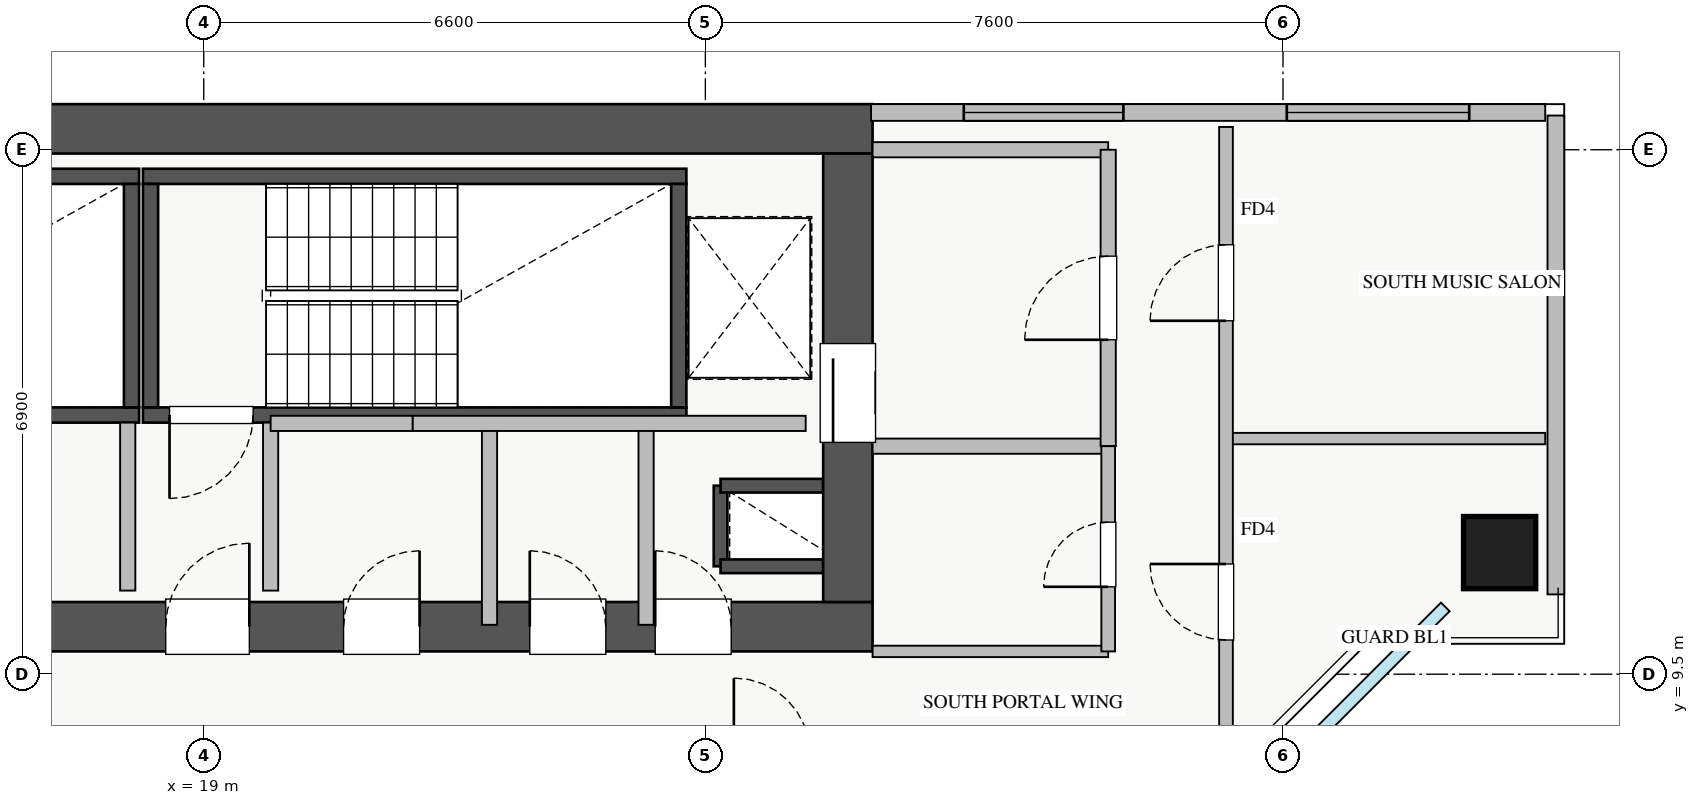
"""IFC4 building model, lengths in metres.
Left out: names, types, materials, properties, quantities, classifications, styles, units other than length and angle.
Written with IfcOpenShell. Run it as: python <this file> out.ifc"""

import sys

from ifc_helpers import new_model, si_unit, direction, frame, frame_2d, origin, origin_2d, place, context, subcontext, project, spatial, rectangle, extrude, source, transform, mapped, element, fill, save


model = new_model("IFC4")
c1 = context("Model", 3, precision=1e-05, world=origin(), true_north=direction((0.0, 1.0)))
c2 = subcontext(c1, "Body", "Model", "MODEL_VIEW")
j1 = project(units=[si_unit("LENGTHUNIT", "METRE"), si_unit("PLANEANGLEUNIT", "RADIAN")], contexts=[c1])
p1 = place(None, origin())
s1 = spatial("IfcSite", under=j1, at=p1, CompositionType="ELEMENT")
p2 = place(p1, origin())
s2 = spatial("IfcBuilding", under=s1, at=p2, CompositionType="ELEMENT")
p3 = place(p2, frame((0.0, 0.0, 169.75)))
s3 = spatial("IfcBuildingStorey", under=s2, at=p3, CompositionType="ELEMENT", Elevation=169.75)
p4 = place(p3, frame((25.8, 10.92, 0.0), z_axis=(0.0, 0.0, 1.0), x_axis=(0.0, 1.0, 0.0)))
e1 = element("IfcWall", 1, at=p4, inside=s3, PredefinedType="SHEAR", context=c2, shape_type="SweptSolid", body=[
    extrude(rectangle(XDim=1.06, YDim=0.18, at=frame_2d((0.53, 0.0))), origin(), (0.0, 0.0, 1.0), 3.0),
])
for number, where, z_axis, x_axis in (
    (2, (25.8, 11.98, 0.0), (0.0, 0.0, 1.0), (1.0, 0.0, 0.0)),
    (3, (25.8, 10.92, 0.0), (0.0, 0.0, 1.0), (1.0, 0.0, 0.0)),
):
    element("IfcWall", number, at=place(p3, frame(where, z_axis=z_axis, x_axis=x_axis)), inside=s3, PredefinedType="SHEAR", context=c2, shape_type="SweptSolid", body=[
        extrude(rectangle(XDim=1.35, YDim=0.18, at=frame_2d((0.675, 0.0))), origin(), (0.0, 0.0, 1.0), 3.0),
    ])
p5 = place(p3, frame((10.85, 12.91, 0.0), z_axis=(0.0, 0.0, 1.0), x_axis=(1.0, 0.0, 0.0)))
e4 = element("IfcWall", 4, at=p5, inside=s3, PredefinedType="SHEAR", context=c2, shape_type="SweptSolid", body=[
    extrude(rectangle(XDim=7.3, YDim=0.2, at=frame_2d((3.65, 0.0))), origin(), (0.0, 0.0, 1.0), 3.25),
])
p6 = place(p5, frame((0.35, 0.0, 0.0)))
e5 = element("IfcOpeningElement", 5, at=p6, cuts=e4, PredefinedType="OPENING", context=c2, shape_type="SweptSolid", body=[
    extrude(rectangle(XDim=1.1, YDim=2.05, at=frame_2d((0.55, 1.025))), frame((0.0, 0.11, 0.0), z_axis=(0.0, -1.0, 0.0), x_axis=(1.0, 0.0, 0.0)), (0.0, 0.0, 1.0), 0.22),
])
p7 = place(p3, frame((10.85, 16.05, 0.0), z_axis=(0.0, 0.0, 1.0), x_axis=(1.0, 0.0, 0.0)))
e6 = element("IfcWall", 6, at=p7, inside=s3, PredefinedType="SHEAR", context=c2, shape_type="SweptSolid", body=[
    extrude(rectangle(XDim=7.3, YDim=0.2, at=frame_2d((3.65, 0.0))), origin(), (0.0, 0.0, 1.0), 3.25),
])
p8 = place(p3, frame((18.05, 13.01, 0.0), z_axis=(0.0, 0.0, 1.0), x_axis=(0.0, 1.0, 0.0)))
e7 = element("IfcWall", 7, at=p8, inside=s3, PredefinedType="SHEAR", context=c2, shape_type="SweptSolid", body=[
    extrude(rectangle(XDim=2.94, YDim=0.2, at=frame_2d((1.47, 0.0))), origin(), (0.0, 0.0, 1.0), 3.25),
])
p9 = place(p3, frame((18.2, 12.91, 0.0), z_axis=(0.0, 0.0, 1.0), x_axis=(1.0, 0.0, 0.0)))
e8 = element("IfcWall", 8, at=p9, inside=s3, PredefinedType="SHEAR", context=c2, shape_type="SweptSolid", body=[
    extrude(rectangle(XDim=7.15, YDim=0.2, at=frame_2d((3.575, 0.0))), origin(), (0.0, 0.0, 1.0), 3.25),
])
p10 = place(p9, frame((0.35, 0.0, 0.0)))
e9 = element("IfcOpeningElement", 9, at=p10, cuts=e8, PredefinedType="OPENING", context=c2, shape_type="SweptSolid", body=[
    extrude(rectangle(XDim=1.1, YDim=2.05, at=frame_2d((0.55, 1.025))), frame((0.0, 0.11, 0.0), z_axis=(0.0, -1.0, 0.0), x_axis=(1.0, 0.0, 0.0)), (0.0, 0.0, 1.0), 0.22),
])
p11 = place(p3, frame((18.2, 16.05, 0.0), z_axis=(0.0, 0.0, 1.0), x_axis=(1.0, 0.0, 0.0)))
e10 = element("IfcWall", 10, at=p11, inside=s3, PredefinedType="SHEAR", context=c2, shape_type="SweptSolid", body=[
    extrude(rectangle(XDim=7.15, YDim=0.2, at=frame_2d((3.575, 0.0))), origin(), (0.0, 0.0, 1.0), 3.25),
])
for number, where, z_axis, x_axis in (
    (11, (18.3, 13.01, 0.0), (0.0, 0.0, 1.0), (0.0, 1.0, 0.0)),
    (12, (25.25, 13.01, 0.0), (0.0, 0.0, 1.0), (0.0, 1.0, 0.0)),
):
    element("IfcWall", number, at=place(p3, frame(where, z_axis=z_axis, x_axis=x_axis)), inside=s3, PredefinedType="SHEAR", context=c2, shape_type="SweptSolid", body=[
        extrude(rectangle(XDim=2.94, YDim=0.2, at=frame_2d((1.47, 0.0))), origin(), (0.0, 0.0, 1.0), 3.25),
    ])
p12 = place(p3, frame((10.2, 10.125, 0.0), z_axis=(0.0, 0.0, 1.0), x_axis=(1.0, 0.0, 0.0)))
e13 = element("IfcWall", 13, at=p12, inside=s3, PredefinedType="SHEAR", context=c2, shape_type="SweptSolid", body=[
    extrude(rectangle(XDim=17.6, YDim=0.65, at=frame_2d((8.8, 0.0))), origin(), (0.0, 0.0, 1.0), 3.25),
])
p13 = place(p12, frame((1.15, 0.0, 0.0)))
e14 = element("IfcOpeningElement", 14, at=p13, cuts=e13, PredefinedType="OPENING", context=c2, shape_type="SweptSolid", body=[
    extrude(rectangle(XDim=1.1, YDim=2.05, at=frame_2d((0.55, 1.025))), frame((0.0, 0.335, 0.0), z_axis=(0.0, -1.0, 0.0), x_axis=(1.0, 0.0, 0.0)), (0.0, 0.0, 1.0), 0.67),
])
p14 = place(p12, frame((8.3, 0.0, 0.0)))
e15 = element("IfcOpeningElement", 15, at=p14, cuts=e13, PredefinedType="OPENING", context=c2, shape_type="SweptSolid", body=[
    extrude(rectangle(XDim=1.1, YDim=2.05, at=frame_2d((0.55, 1.025))), frame((0.0, 0.335, 0.0), z_axis=(0.0, -1.0, 0.0), x_axis=(1.0, 0.0, 0.0)), (0.0, 0.0, 1.0), 0.67),
])
p15 = place(p12, frame((4.9, 0.0, 0.0)))
e16 = element("IfcOpeningElement", 16, at=p15, cuts=e13, PredefinedType="OPENING", context=c2, shape_type="SweptSolid", body=[
    extrude(rectangle(XDim=1.1, YDim=2.05, at=frame_2d((0.55, 1.025))), frame((0.0, 0.335, 0.0), z_axis=(0.0, -1.0, 0.0), x_axis=(1.0, 0.0, 0.0)), (0.0, 0.0, 1.0), 0.67),
])
p16 = place(p12, frame((14.74, 0.0, 0.0)))
e17 = element("IfcOpeningElement", 17, at=p16, cuts=e13, PredefinedType="OPENING", context=c2, shape_type="SweptSolid", body=[
    extrude(rectangle(XDim=1.0, YDim=2.05, at=frame_2d((0.5, 1.025))), frame((0.0, 0.335, 0.0), z_axis=(0.0, -1.0, 0.0), x_axis=(1.0, 0.0, 0.0)), (0.0, 0.0, 1.0), 0.67),
])
p17 = place(p12, frame((10.64, 0.0, 0.0)))
e18 = element("IfcOpeningElement", 18, at=p17, cuts=e13, PredefinedType="OPENING", context=c2, shape_type="SweptSolid", body=[
    extrude(rectangle(XDim=1.0, YDim=2.05, at=frame_2d((0.5, 1.025))), frame((0.0, 0.335, 0.0), z_axis=(0.0, -1.0, 0.0), x_axis=(1.0, 0.0, 0.0)), (0.0, 0.0, 1.0), 0.67),
])
p18 = place(p12, frame((13.09, 0.0, 0.0)))
e19 = element("IfcOpeningElement", 19, at=p18, cuts=e13, PredefinedType="OPENING", context=c2, shape_type="SweptSolid", body=[
    extrude(rectangle(XDim=1.0, YDim=2.05, at=frame_2d((0.5, 1.025))), frame((0.0, 0.335, 0.0), z_axis=(0.0, -1.0, 0.0), x_axis=(1.0, 0.0, 0.0)), (0.0, 0.0, 1.0), 0.67),
])
p19 = place(p3, frame((10.2, 16.675, 0.0), z_axis=(0.0, 0.0, 1.0), x_axis=(1.0, 0.0, 0.0)))
e20 = element("IfcWall", 20, at=p19, inside=s3, PredefinedType="SHEAR", context=c2, shape_type="SweptSolid", body=[
    extrude(rectangle(XDim=17.6, YDim=0.65, at=frame_2d((8.8, 0.0))), origin(), (0.0, 0.0, 1.0), 3.25),
])
p20 = place(p3, frame((27.475, 10.45, 0.0), z_axis=(0.0, 0.0, 1.0), x_axis=(0.0, 1.0, 0.0)))
e21 = element("IfcWall", 21, at=p20, inside=s3, PredefinedType="SHEAR", context=c2, shape_type="SweptSolid", body=[
    extrude(rectangle(XDim=5.9, YDim=0.65, at=frame_2d((2.95, 0.0))), origin(), (0.0, 0.0, 1.0), 3.25),
])
p21 = place(p20, frame((2.1, 0.0, 0.0)))
e22 = element("IfcOpeningElement", 22, at=p21, cuts=e21, PredefinedType="OPENING", context=c2, shape_type="SweptSolid", body=[
    extrude(rectangle(XDim=1.3, YDim=2.05, at=frame_2d((0.65, 1.025))), frame((0.0, 0.335, 0.0), z_axis=(0.0, -1.0, 0.0), x_axis=(1.0, 0.0, 0.0)), (0.0, 0.0, 1.0), 0.67),
])
m1 = source(origin(), c2, "Body", "SweptSolid", [
    extrude(rectangle(XDim=0.95, YDim=0.95, at=origin_2d()), origin(), (0.0, 0.0, 1.0), 3.25),
])
p22 = place(p3, frame((36.05, 11.1, 0.0), z_axis=(0.0, 0.0, 1.0), x_axis=(1.0, 0.0, 0.0)))
e23 = element("IfcColumn", 23, at=p22, inside=s3, PredefinedType="COLUMN", context=c2, shape_type="MappedRepresentation", body=[
    mapped(m1, transform((0.0, 0.0, 0.0), x_axis=(1.0, 0.0, 0.0), y_axis=(0.0, 1.0, 0.0), z_axis=(0.0, 0.0, 1.0), scale=1.0)),
])
p23 = place(p3, frame((27.78, 16.89, 0.0), z_axis=(0.0, 0.0, 1.0), x_axis=(1.0, 0.0, 0.0)))
e24 = element("IfcWall", 24, at=p23, inside=s3, PredefinedType="STANDARD", context=c2, shape_type="SweptSolid", body=[
    extrude(rectangle(XDim=8.87, YDim=0.22, at=frame_2d((4.435, 0.0))), origin(), (0.0, 0.0, 1.0), 2.54),
])
p24 = place(p23, frame((1.22, 0.0, 0.9)))
e25 = element("IfcOpeningElement", 25, at=p24, cuts=e24, PredefinedType="OPENING", context=c2, shape_type="SweptSolid", body=[
    extrude(rectangle(XDim=2.1, YDim=1.46, at=frame_2d((1.05, 0.73))), frame((0.0, 0.12, 0.0), z_axis=(0.0, -1.0, 0.0), x_axis=(1.0, 0.0, 0.0)), (0.0, 0.0, 1.0), 0.24),
])
p25 = place(p23, frame((5.47, 0.0, 0.9)))
e26 = element("IfcOpeningElement", 26, at=p25, cuts=e24, PredefinedType="OPENING", context=c2, shape_type="SweptSolid", body=[
    extrude(rectangle(XDim=2.4, YDim=1.46, at=frame_2d((1.2, 0.73))), frame((0.0, 0.12, 0.0), z_axis=(0.0, -1.0, 0.0), x_axis=(1.0, 0.0, 0.0)), (0.0, 0.0, 1.0), 0.24),
])
p26 = place(p3, frame((36.79, 10.55, 0.0), z_axis=(0.0, 0.0, 1.0), x_axis=(0.0, 1.0, 0.0)))
e27 = element("IfcWall", 27, at=p26, inside=s3, PredefinedType="STANDARD", context=c2, shape_type="SweptSolid", body=[
    extrude(rectangle(XDim=6.3, YDim=0.22, at=frame_2d((3.15, 0.0))), origin(), (0.0, 0.0, 1.0), 2.54),
])
for number, where, z_axis, x_axis in (
    (28, (27.8, 16.4, 0.0), (0.0, 0.0, 1.0), (1.0, 0.0, 0.0)),
    (29, (27.8, 12.5, 0.0), (0.0, 0.0, 1.0), (1.0, 0.0, 0.0)),
):
    element("IfcWall", number, at=place(p3, frame(where, z_axis=z_axis, x_axis=x_axis)), inside=s3, PredefinedType="PARTITIONING", context=c2, shape_type="SweptSolid", body=[
        extrude(rectangle(XDim=3.1, YDim=0.2, at=frame_2d((1.55, 0.0))), origin(), (0.0, 0.0, 1.0), 3.0),
    ])
p27 = place(p3, frame((30.9, 12.5, 0.0), z_axis=(0.0, 0.0, 1.0), x_axis=(0.0, 1.0, 0.0)))
e30 = element("IfcWall", 30, at=p27, inside=s3, PredefinedType="PARTITIONING", context=c2, shape_type="SweptSolid", body=[
    extrude(rectangle(XDim=3.9, YDim=0.2, at=frame_2d((1.95, 0.0))), origin(), (0.0, 0.0, 1.0), 3.0),
])
p28 = place(p27, frame((1.4, 0.0, 0.0)))
e31 = element("IfcOpeningElement", 31, at=p28, cuts=e30, PredefinedType="OPENING", context=c2, shape_type="SweptSolid", body=[
    extrude(rectangle(XDim=1.1, YDim=2.05, at=frame_2d((0.55, 1.025))), frame((0.0, 0.11, 0.0), z_axis=(0.0, -1.0, 0.0), x_axis=(1.0, 0.0, 0.0)), (0.0, 0.0, 1.0), 0.22),
])
for number, where, z_axis, x_axis in (
    (32, (18.0, 10.6, 0.0), (0.0, 0.0, 1.0), (0.0, 1.0, 0.0)),
    (33, (19.88, 10.6, 0.0), (0.0, 0.0, 1.0), (0.0, 1.0, 0.0)),
):
    element("IfcWall", number, at=place(p3, frame(where, z_axis=z_axis, x_axis=x_axis)), inside=s3, PredefinedType="PARTITIONING", context=c2, shape_type="SweptSolid", body=[
        extrude(rectangle(XDim=2.21, YDim=0.2, at=frame_2d((1.105, 0.0))), origin(), (0.0, 0.0, 1.0), 3.0),
    ])
p29 = place(p3, frame((24.82, 10.15, 0.0), z_axis=(0.0, 0.0, 1.0), x_axis=(0.0, 1.0, 0.0)))
e34 = element("IfcWall", 34, at=p29, inside=s3, PredefinedType="PARTITIONING", context=c2, shape_type="SweptSolid", body=[
    extrude(rectangle(XDim=2.65, YDim=0.2, at=frame_2d((1.325, 0.0))), origin(), (0.0, 0.0, 1.0), 3.0),
])
p30 = place(p3, frame((19.88, 12.8, 0.0), z_axis=(0.0, 0.0, 1.0), x_axis=(1.0, 0.0, 0.0)))
e35 = element("IfcWall", 35, at=p30, inside=s3, PredefinedType="PARTITIONING", context=c2, shape_type="SweptSolid", body=[
    extrude(rectangle(XDim=1.87, YDim=0.2, at=frame_2d((0.935, 0.0))), origin(), (0.0, 0.0, 1.0), 3.0),
])
p31 = place(p3, frame((22.76, 10.15, 0.0), z_axis=(0.0, 0.0, 1.0), x_axis=(0.0, 1.0, 0.0)))
e36 = element("IfcWall", 36, at=p31, inside=s3, PredefinedType="PARTITIONING", context=c2, shape_type="SweptSolid", body=[
    extrude(rectangle(XDim=2.65, YDim=0.2, at=frame_2d((1.325, 0.0))), origin(), (0.0, 0.0, 1.0), 3.0),
])
p32 = place(p3, frame((21.75, 12.8, 0.0), z_axis=(0.0, 0.0, 1.0), x_axis=(1.0, 0.0, 0.0)))
e37 = element("IfcWall", 37, at=p32, inside=s3, PredefinedType="PARTITIONING", context=c2, shape_type="SweptSolid", body=[
    extrude(rectangle(XDim=5.17, YDim=0.2, at=frame_2d((2.585, 0.0))), origin(), (0.0, 0.0, 1.0), 3.0),
])
p33 = place(p3, frame((27.8, 9.8, 0.0), z_axis=(0.0, 0.0, 1.0), x_axis=(1.0, 0.0, 0.0)))
e38 = element("IfcWall", 38, at=p33, inside=s3, PredefinedType="PARTITIONING", context=c2, shape_type="SweptSolid", body=[
    extrude(rectangle(XDim=3.1, YDim=0.15, at=frame_2d((1.55, 0.0))), origin(), (0.0, 0.0, 1.0), 3.0),
])
p34 = place(p3, frame((30.9, 9.8, 0.0), z_axis=(0.0, 0.0, 1.0), x_axis=(0.0, 1.0, 0.0)))
e39 = element("IfcWall", 39, at=p34, inside=s3, PredefinedType="PARTITIONING", context=c2, shape_type="SweptSolid", body=[
    extrude(rectangle(XDim=2.7, YDim=0.18, at=frame_2d((1.35, 0.0))), origin(), (0.0, 0.0, 1.0), 2.495),
])
p35 = place(p34, frame((0.85, 0.0, 0.0)))
e40 = element("IfcOpeningElement", 40, at=p35, cuts=e39, PredefinedType="OPENING", context=c2, shape_type="SweptSolid", body=[
    extrude(rectangle(XDim=0.85, YDim=2.05, at=frame_2d((0.425, 1.025))), frame((0.0, 0.1, 0.0), z_axis=(0.0, -1.0, 0.0), x_axis=(1.0, 0.0, 0.0)), (0.0, 0.0, 1.0), 0.2),
])
p36 = place(p3, frame((32.45, 12.6, 0.0), z_axis=(0.0, 0.0, 1.0), x_axis=(1.0, 0.0, 0.0)))
e41 = element("IfcWall", 41, at=p36, inside=s3, PredefinedType="PARTITIONING", context=c2, shape_type="SweptSolid", body=[
    extrude(rectangle(XDim=4.2, YDim=0.15, at=frame_2d((2.1, 0.0))), origin(), (0.0, 0.0, 1.0), 3.0),
])
p37 = place(p3, frame((32.45, 5.35, 0.0), z_axis=(0.0, 0.0, 1.0), x_axis=(0.0, 1.0, 0.0)))
e42 = element("IfcWall", 42, at=p37, inside=s3, PredefinedType="PARTITIONING", context=c2, shape_type="SweptSolid", body=[
    extrude(rectangle(XDim=11.35, YDim=0.18, at=frame_2d((5.675, 0.0))), origin(), (0.0, 0.0, 1.0), 3.0),
])
p38 = place(p37, frame((4.6, 0.0, 0.0)))
e43 = element("IfcOpeningElement", 43, at=p38, cuts=e42, PredefinedType="OPENING", context=c2, shape_type="SweptSolid", body=[
    extrude(rectangle(XDim=1.0, YDim=2.05, at=frame_2d((0.5, 1.025))), frame((0.0, 0.1, 0.0), z_axis=(0.0, -1.0, 0.0), x_axis=(1.0, 0.0, 0.0)), (0.0, 0.0, 1.0), 0.2),
])
p39 = place(p37, frame((8.8, 0.0, 0.0)))
e44 = element("IfcOpeningElement", 44, at=p39, cuts=e42, PredefinedType="OPENING", context=c2, shape_type="SweptSolid", body=[
    extrude(rectangle(XDim=1.0, YDim=2.05, at=frame_2d((0.5, 1.025))), frame((0.0, 0.1, 0.0), z_axis=(0.0, -1.0, 0.0), x_axis=(1.0, 0.0, 0.0)), (0.0, 0.0, 1.0), 0.2),
])
m2 = source(origin(), c2, "Body", "SweptSolid", [
    extrude(rectangle(XDim=2.1, YDim=1.46, at=frame_2d((1.05, 0.73))), frame((0.0, 0.03, 0.0), z_axis=(0.0, -1.0, 0.0), x_axis=(1.0, 0.0, 0.0)), (0.0, 0.0, 1.0), 0.06),
])
p40 = place(p24, origin())
e45 = element("IfcWindow", 45, at=p40, inside=s3, PartitioningType="TRIPLE_PANEL_VERTICAL", PredefinedType="WINDOW", context=c2, shape_type="MappedRepresentation", body=[
    mapped(m2, transform((0.0, 0.0, 0.0), x_axis=(1.0, 0.0, 0.0), y_axis=(0.0, 1.0, 0.0), z_axis=(0.0, 0.0, 1.0), scale=1.0)),
])
fill(e25, e45)
m3 = source(origin(), c2, "Body", "SweptSolid", [
    extrude(rectangle(XDim=2.4, YDim=1.46, at=frame_2d((1.2, 0.73))), frame((0.0, 0.03, 0.0), z_axis=(0.0, -1.0, 0.0), x_axis=(1.0, 0.0, 0.0)), (0.0, 0.0, 1.0), 0.06),
])
p41 = place(p25, origin())
e46 = element("IfcWindow", 46, at=p41, inside=s3, PartitioningType="TRIPLE_PANEL_VERTICAL", PredefinedType="WINDOW", context=c2, shape_type="MappedRepresentation", body=[
    mapped(m3, transform((0.0, 0.0, 0.0), x_axis=(1.0, 0.0, 0.0), y_axis=(0.0, 1.0, 0.0), z_axis=(0.0, 0.0, 1.0), scale=1.0)),
])
fill(e26, e46)
m4 = source(origin(), c2, "Body", "SweptSolid", [
    extrude(rectangle(XDim=1.3, YDim=2.05, at=frame_2d((0.65, 1.025))), frame((0.0, 0.025, 0.0), z_axis=(0.0, -1.0, 0.0), x_axis=(1.0, 0.0, 0.0)), (0.0, 0.0, 1.0), 0.05),
])
p42 = place(p21, origin())
e47 = element("IfcDoor", 47, at=p42, inside=s3, OperationType="SLIDING_TO_RIGHT", PredefinedType="DOOR", context=c2, shape_type="MappedRepresentation", body=[
    mapped(m4, transform((0.0, 0.0, 0.0), x_axis=(1.0, 0.0, 0.0), y_axis=(0.0, 1.0, 0.0), z_axis=(0.0, 0.0, 1.0), scale=1.0)),
])
fill(e22, e47)
m5 = source(origin(), c2, "Body", "SweptSolid", [
    extrude(rectangle(XDim=1.1, YDim=2.05, at=frame_2d((0.55, 1.025))), frame((0.0, 0.025, 0.0), z_axis=(0.0, -1.0, 0.0), x_axis=(1.0, 0.0, 0.0)), (0.0, 0.0, 1.0), 0.05),
])
p43 = place(p14, origin())
e48 = element("IfcDoor", 48, at=p43, inside=s3, OperationType="SINGLE_SWING_RIGHT", PredefinedType="DOOR", context=c2, shape_type="MappedRepresentation", body=[
    mapped(m5, transform((0.0, 0.0, 0.0), x_axis=(1.0, 0.0, 0.0), y_axis=(0.0, 1.0, 0.0), z_axis=(0.0, 0.0, 1.0), scale=1.0)),
])
fill(e15, e48)
p44 = place(p10, frame((1.1, 0.0, 0.0), z_axis=(0.0, 0.0, 1.0), x_axis=(-1.0, 0.0, 0.0)))
e49 = element("IfcDoor", 49, at=p44, inside=s3, OperationType="SINGLE_SWING_LEFT", PredefinedType="DOOR", context=c2, shape_type="MappedRepresentation", body=[
    mapped(m5, transform((0.0, 0.0, 0.0), x_axis=(1.0, 0.0, 0.0), y_axis=(0.0, 1.0, 0.0), z_axis=(0.0, 0.0, 1.0), scale=1.0)),
])
fill(e9, e49)
m6 = source(origin(), c2, "Body", "SweptSolid", [
    extrude(rectangle(XDim=1.0, YDim=2.05, at=frame_2d((0.5, 1.025))), frame((0.0, 0.025, 0.0), z_axis=(0.0, -1.0, 0.0), x_axis=(1.0, 0.0, 0.0)), (0.0, 0.0, 1.0), 0.05),
])
p45 = place(p16, origin())
e50 = element("IfcDoor", 50, at=p45, inside=s3, OperationType="SINGLE_SWING_LEFT", PredefinedType="DOOR", context=c2, shape_type="MappedRepresentation", body=[
    mapped(m6, transform((0.0, 0.0, 0.0), x_axis=(1.0, 0.0, 0.0), y_axis=(0.0, 1.0, 0.0), z_axis=(0.0, 0.0, 1.0), scale=1.0)),
])
fill(e17, e50)
p46 = place(p17, origin())
e51 = element("IfcDoor", 51, at=p46, inside=s3, OperationType="SINGLE_SWING_RIGHT", PredefinedType="DOOR", context=c2, shape_type="MappedRepresentation", body=[
    mapped(m6, transform((0.0, 0.0, 0.0), x_axis=(1.0, 0.0, 0.0), y_axis=(0.0, 1.0, 0.0), z_axis=(0.0, 0.0, 1.0), scale=1.0)),
])
fill(e18, e51)
p47 = place(p18, origin())
e52 = element("IfcDoor", 52, at=p47, inside=s3, OperationType="SINGLE_SWING_LEFT", PredefinedType="DOOR", context=c2, shape_type="MappedRepresentation", body=[
    mapped(m6, transform((0.0, 0.0, 0.0), x_axis=(1.0, 0.0, 0.0), y_axis=(0.0, 1.0, 0.0), z_axis=(0.0, 0.0, 1.0), scale=1.0)),
])
fill(e19, e52)
p48 = place(p28, origin())
e53 = element("IfcDoor", 53, at=p48, inside=s3, OperationType="SINGLE_SWING_LEFT", PredefinedType="DOOR", context=c2, shape_type="MappedRepresentation", body=[
    mapped(m5, transform((0.0, 0.0, 0.0), x_axis=(1.0, 0.0, 0.0), y_axis=(0.0, 1.0, 0.0), z_axis=(0.0, 0.0, 1.0), scale=1.0)),
])
fill(e31, e53)
m7 = source(origin(), c2, "Body", "SweptSolid", [
    extrude(rectangle(XDim=0.85, YDim=2.05, at=frame_2d((0.425, 1.025))), frame((0.0, 0.025, 0.0), z_axis=(0.0, -1.0, 0.0), x_axis=(1.0, 0.0, 0.0)), (0.0, 0.0, 1.0), 0.05),
])
p49 = place(p35, origin())
e54 = element("IfcDoor", 54, at=p49, inside=s3, OperationType="SINGLE_SWING_LEFT", PredefinedType="DOOR", context=c2, shape_type="MappedRepresentation", body=[
    mapped(m7, transform((0.0, 0.0, 0.0), x_axis=(1.0, 0.0, 0.0), y_axis=(0.0, 1.0, 0.0), z_axis=(0.0, 0.0, 1.0), scale=1.0)),
])
fill(e40, e54)
p50 = place(p38, origin())
e55 = element("IfcDoor", 55, at=p50, inside=s3, OperationType="SINGLE_SWING_RIGHT", PredefinedType="DOOR", context=c2, shape_type="MappedRepresentation", body=[
    mapped(m6, transform((0.0, 0.0, 0.0), x_axis=(1.0, 0.0, 0.0), y_axis=(0.0, 1.0, 0.0), z_axis=(0.0, 0.0, 1.0), scale=1.0)),
])
fill(e43, e55)
p51 = place(p39, origin())
e56 = element("IfcDoor", 56, at=p51, inside=s3, OperationType="SINGLE_SWING_LEFT", PredefinedType="DOOR", context=c2, shape_type="MappedRepresentation", body=[
    mapped(m6, transform((0.0, 0.0, 0.0), x_axis=(1.0, 0.0, 0.0), y_axis=(0.0, 1.0, 0.0), z_axis=(0.0, 0.0, 1.0), scale=1.0)),
])
fill(e44, e56)
save(model, sys.argv[1])
